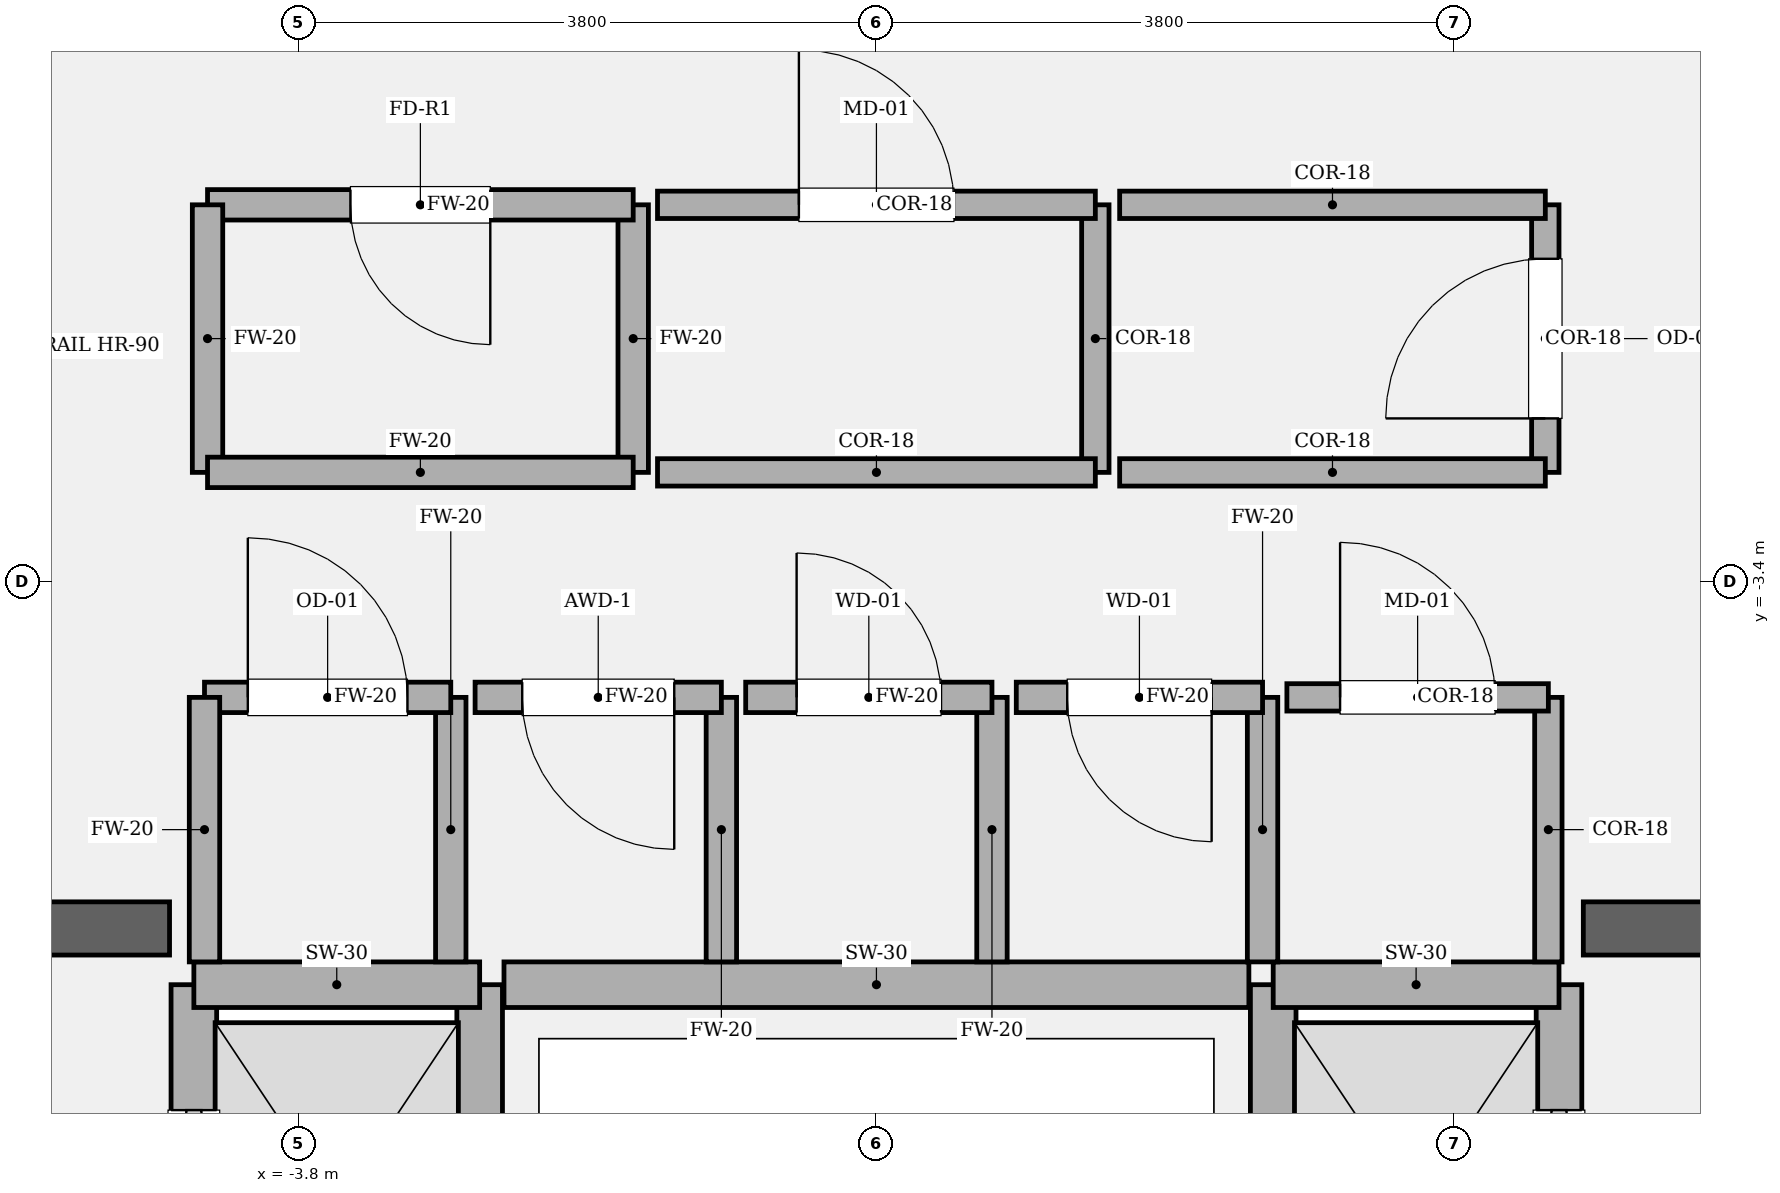
"""IFC4 building model, lengths in metres.
Left out: names, types, materials, properties, quantities, classifications, styles, units other than length and angle.
Written with IfcOpenShell. Run it as: python <this file> out.ifc"""

import sys

from ifc_helpers import new_model, si_unit, direction, frame, frame_2d, origin, place, context, subcontext, project, spatial, rectangle, extrude, element, fill, save


model = new_model("IFC4")
c1 = context("Model", 3, precision=1e-05, world=origin(), true_north=direction((0.0, 1.0)))
c2 = subcontext(c1, "Body", "Model", "MODEL_VIEW")
j1 = project(units=[si_unit("LENGTHUNIT", "METRE"), si_unit("PLANEANGLEUNIT", "RADIAN")], contexts=[c1])
p1 = place(None, origin())
s1 = spatial("IfcSite", under=j1, at=p1, CompositionType="ELEMENT")
p2 = place(p1, origin())
s2 = spatial("IfcBuilding", under=s1, at=p2, CompositionType="ELEMENT")
p3 = place(p2, frame((0.0, 0.0, 288.0)))
s3 = spatial("IfcBuildingStorey", under=s2, at=p3, CompositionType="ELEMENT", Elevation=288.0)
p4 = place(p3, frame((-9.925, -5.68, 0.0), z_axis=(0.0, 0.0, 1.0), x_axis=(1.0, 0.0, 0.0)))
e1 = element("IfcWall", 1, at=p4, inside=s3, PredefinedType="SOLIDWALL", context=c2, shape_type="SweptSolid", body=[
    extrude(rectangle(XDim=5.275, YDim=0.35, at=frame_2d((2.638, 0.0))), origin(), (0.0, 0.0, 1.0), 4.2),
])
p5 = place(p4, frame((1.385, 0.0, 0.0)))
e2 = element("IfcOpeningElement", 2, at=p5, cuts=e1, PredefinedType="OPENING", context=c2, shape_type="SweptSolid", body=[
    extrude(rectangle(XDim=1.18, YDim=2.2, at=frame_2d((0.59, 1.1))), frame((0.0, 0.185, 0.0), z_axis=(0.0, -1.0, 0.0), x_axis=(1.0, 0.0, 0.0)), (0.0, 0.0, 1.0), 0.37),
])
p6 = place(p3, frame((4.65, -5.68, 0.0), z_axis=(0.0, 0.0, 1.0), x_axis=(1.0, 0.0, 0.0)))
e3 = element("IfcWall", 3, at=p6, inside=s3, PredefinedType="SOLIDWALL", context=c2, shape_type="SweptSolid", body=[
    extrude(rectangle(XDim=5.275, YDim=0.35, at=frame_2d((2.638, 0.0))), origin(), (0.0, 0.0, 1.0), 4.2),
])
p7 = place(p6, frame((2.71, 0.0, 0.0)))
e4 = element("IfcOpeningElement", 4, at=p7, cuts=e3, PredefinedType="OPENING", context=c2, shape_type="SweptSolid", body=[
    extrude(rectangle(XDim=1.18, YDim=2.2, at=frame_2d((0.59, 1.1))), frame((0.0, 0.185, 0.0), z_axis=(0.0, -1.0, 0.0), x_axis=(1.0, 0.0, 0.0)), (0.0, 0.0, 1.0), 0.37),
])
p8 = place(p3, frame((-4.49, -8.82, 0.0), z_axis=(0.0, 0.0, 1.0), x_axis=(0.0, 1.0, 0.0)))
e5 = element("IfcWall", 5, at=p8, inside=s3, PredefinedType="SOLIDWALL", context=c2, shape_type="SweptSolid", body=[
    extrude(rectangle(XDim=2.77, YDim=0.3, at=frame_2d((1.385, 0.0))), origin(), (0.0, 0.0, 1.0), 4.0),
])
p9 = place(p8, frame((0.825, 0.0, 0.0)))
e6 = element("IfcOpeningElement", 6, at=p9, cuts=e5, PredefinedType="OPENING", context=c2, shape_type="SweptSolid", body=[
    extrude(rectangle(XDim=1.12, YDim=2.25, at=frame_2d((0.56, 1.125))), frame((0.0, 0.16, 0.0), z_axis=(0.0, -1.0, 0.0), x_axis=(1.0, 0.0, 0.0)), (0.0, 0.0, 1.0), 0.32),
])
p10 = place(p3, frame((-2.61, -8.82, 0.0), z_axis=(0.0, 0.0, 1.0), x_axis=(0.0, 1.0, 0.0)))
e7 = element("IfcWall", 7, at=p10, inside=s3, PredefinedType="SOLIDWALL", context=c2, shape_type="SweptSolid", body=[
    extrude(rectangle(XDim=2.77, YDim=0.3, at=frame_2d((1.385, 0.0))), origin(), (0.0, 0.0, 1.0), 4.0),
])
p11 = place(p3, frame((-4.49, -6.05, 0.0), z_axis=(0.0, 0.0, 1.0), x_axis=(1.0, 0.0, 0.0)))
e8 = element("IfcWall", 8, at=p11, inside=s3, PredefinedType="SOLIDWALL", context=c2, shape_type="SweptSolid", body=[
    extrude(rectangle(XDim=1.88, YDim=0.3, at=frame_2d((0.94, 0.0))), origin(), (0.0, 0.0, 1.0), 4.0),
])
p12 = place(p3, frame((4.49, -8.82, 0.0), z_axis=(0.0, 0.0, 1.0), x_axis=(0.0, 1.0, 0.0)))
e9 = element("IfcWall", 9, at=p12, inside=s3, PredefinedType="SOLIDWALL", context=c2, shape_type="SweptSolid", body=[
    extrude(rectangle(XDim=2.77, YDim=0.3, at=frame_2d((1.385, 0.0))), origin(), (0.0, 0.0, 1.0), 4.0),
])
p13 = place(p12, frame((0.825, 0.0, 0.0)))
e10 = element("IfcOpeningElement", 10, at=p13, cuts=e9, PredefinedType="OPENING", context=c2, shape_type="SweptSolid", body=[
    extrude(rectangle(XDim=1.12, YDim=2.25, at=frame_2d((0.56, 1.125))), frame((0.0, 0.16, 0.0), z_axis=(0.0, -1.0, 0.0), x_axis=(1.0, 0.0, 0.0)), (0.0, 0.0, 1.0), 0.32),
])
p14 = place(p3, frame((2.61, -8.82, 0.0), z_axis=(0.0, 0.0, 1.0), x_axis=(0.0, 1.0, 0.0)))
e11 = element("IfcWall", 11, at=p14, inside=s3, PredefinedType="SOLIDWALL", context=c2, shape_type="SweptSolid", body=[
    extrude(rectangle(XDim=2.77, YDim=0.3, at=frame_2d((1.385, 0.0))), origin(), (0.0, 0.0, 1.0), 4.0),
])
p15 = place(p3, frame((2.61, -6.05, 0.0), z_axis=(0.0, 0.0, 1.0), x_axis=(1.0, 0.0, 0.0)))
e12 = element("IfcWall", 12, at=p15, inside=s3, PredefinedType="SOLIDWALL", context=c2, shape_type="SweptSolid", body=[
    extrude(rectangle(XDim=1.88, YDim=0.3, at=frame_2d((0.94, 0.0))), origin(), (0.0, 0.0, 1.0), 4.0),
])
p16 = place(p3, frame((-2.45, -6.05, 0.0), z_axis=(0.0, 0.0, 1.0), x_axis=(1.0, 0.0, 0.0)))
e13 = element("IfcWall", 13, at=p16, inside=s3, PredefinedType="SOLIDWALL", context=c2, shape_type="SweptSolid", body=[
    extrude(rectangle(XDim=4.9, YDim=0.3, at=frame_2d((2.45, 0.0))), origin(), (0.0, 0.0, 1.0), 4.0),
])
p17 = place(p3, frame((-2.8, -5.9, 0.0), z_axis=(0.0, 0.0, 1.0), x_axis=(0.0, 1.0, 0.0)))
e14 = element("IfcWall", 14, at=p17, inside=s3, PredefinedType="SOLIDWALL", context=c2, shape_type="SweptSolid", body=[
    extrude(rectangle(XDim=1.74, YDim=0.2, at=frame_2d((0.87, 0.0))), origin(), (0.0, 0.0, 1.0), 4.0),
])
p18 = place(p3, frame((-2.8, -4.16, 0.0), z_axis=(0.0, 0.0, 1.0), x_axis=(-1.0, 0.0, 0.0)))
e15 = element("IfcWall", 15, at=p18, inside=s3, PredefinedType="SOLIDWALL", context=c2, shape_type="SweptSolid", body=[
    extrude(rectangle(XDim=1.62, YDim=0.2, at=frame_2d((0.81, 0.0))), origin(), (0.0, 0.0, 1.0), 4.0),
])
p19 = place(p18, frame((0.285, 0.0, 0.0)))
e16 = element("IfcOpeningElement", 16, at=p19, cuts=e15, PredefinedType="OPENING", context=c2, shape_type="SweptSolid", body=[
    extrude(rectangle(XDim=1.05, YDim=2.2, at=frame_2d((0.525, 1.1))), frame((0.0, 0.11, 0.0), z_axis=(0.0, -1.0, 0.0), x_axis=(1.0, 0.0, 0.0)), (0.0, 0.0, 1.0), 0.22),
])
for number, where, z_axis, x_axis in (
    (17, (-4.42, -4.16, 0.0), (0.0, 0.0, 1.0), (0.0, -1.0, 0.0)),
    (18, (-1.02, -5.9, 0.0), (0.0, 0.0, 1.0), (0.0, 1.0, 0.0)),
):
    element("IfcWall", number, at=place(p3, frame(where, z_axis=z_axis, x_axis=x_axis)), inside=s3, PredefinedType="SOLIDWALL", context=c2, shape_type="SweptSolid", body=[
        extrude(rectangle(XDim=1.74, YDim=0.2, at=frame_2d((0.87, 0.0))), origin(), (0.0, 0.0, 1.0), 4.0),
    ])
p20 = place(p3, frame((-1.02, -4.16, 0.0), z_axis=(0.0, 0.0, 1.0), x_axis=(-1.0, 0.0, 0.0)))
e19 = element("IfcWall", 19, at=p20, inside=s3, PredefinedType="SOLIDWALL", context=c2, shape_type="SweptSolid", body=[
    extrude(rectangle(XDim=1.62, YDim=0.2, at=frame_2d((0.81, 0.0))), origin(), (0.0, 0.0, 1.0), 4.0),
])
p21 = place(p20, frame((0.31, 0.0, 0.0)))
e20 = element("IfcOpeningElement", 20, at=p21, cuts=e19, PredefinedType="OPENING", context=c2, shape_type="SweptSolid", body=[
    extrude(rectangle(XDim=1.0, YDim=2.15, at=frame_2d((0.5, 1.075))), frame((0.0, 0.11, 0.0), z_axis=(0.0, -1.0, 0.0), x_axis=(1.0, 0.0, 0.0)), (0.0, 0.0, 1.0), 0.22),
])
p22 = place(p3, frame((0.76, -5.9, 0.0), z_axis=(0.0, 0.0, 1.0), x_axis=(0.0, 1.0, 0.0)))
e21 = element("IfcWall", 21, at=p22, inside=s3, PredefinedType="SOLIDWALL", context=c2, shape_type="SweptSolid", body=[
    extrude(rectangle(XDim=1.74, YDim=0.2, at=frame_2d((0.87, 0.0))), origin(), (0.0, 0.0, 1.0), 4.0),
])
p23 = place(p3, frame((0.76, -4.16, 0.0), z_axis=(0.0, 0.0, 1.0), x_axis=(-1.0, 0.0, 0.0)))
e22 = element("IfcWall", 22, at=p23, inside=s3, PredefinedType="SOLIDWALL", context=c2, shape_type="SweptSolid", body=[
    extrude(rectangle(XDim=1.62, YDim=0.2, at=frame_2d((0.81, 0.0))), origin(), (0.0, 0.0, 1.0), 4.0),
])
p24 = place(p23, frame((0.335, 0.0, 0.0)))
e23 = element("IfcOpeningElement", 23, at=p24, cuts=e22, PredefinedType="OPENING", context=c2, shape_type="SweptSolid", body=[
    extrude(rectangle(XDim=0.95, YDim=2.15, at=frame_2d((0.475, 1.075))), frame((0.0, 0.11, 0.0), z_axis=(0.0, -1.0, 0.0), x_axis=(1.0, 0.0, 0.0)), (0.0, 0.0, 1.0), 0.22),
])
p25 = place(p3, frame((2.54, -5.9, 0.0), z_axis=(0.0, 0.0, 1.0), x_axis=(0.0, 1.0, 0.0)))
e24 = element("IfcWall", 24, at=p25, inside=s3, PredefinedType="SOLIDWALL", context=c2, shape_type="SweptSolid", body=[
    extrude(rectangle(XDim=1.74, YDim=0.2, at=frame_2d((0.87, 0.0))), origin(), (0.0, 0.0, 1.0), 4.0),
])
p26 = place(p3, frame((2.54, -4.16, 0.0), z_axis=(0.0, 0.0, 1.0), x_axis=(-1.0, 0.0, 0.0)))
e25 = element("IfcWall", 25, at=p26, inside=s3, PredefinedType="SOLIDWALL", context=c2, shape_type="SweptSolid", body=[
    extrude(rectangle(XDim=1.62, YDim=0.2, at=frame_2d((0.81, 0.0))), origin(), (0.0, 0.0, 1.0), 4.0),
])
p27 = place(p26, frame((0.335, 0.0, 0.0)))
e26 = element("IfcOpeningElement", 26, at=p27, cuts=e25, PredefinedType="OPENING", context=c2, shape_type="SweptSolid", body=[
    extrude(rectangle(XDim=0.95, YDim=2.15, at=frame_2d((0.475, 1.075))), frame((0.0, 0.11, 0.0), z_axis=(0.0, -1.0, 0.0), x_axis=(1.0, 0.0, 0.0)), (0.0, 0.0, 1.0), 0.22),
])
p28 = place(p3, frame((4.42, -5.9, 0.0), z_axis=(0.0, 0.0, 1.0), x_axis=(0.0, 1.0, 0.0)))
e27 = element("IfcWall", 27, at=p28, inside=s3, PredefinedType="PARTITIONING", context=c2, shape_type="SweptSolid", body=[
    extrude(rectangle(XDim=1.74, YDim=0.18, at=frame_2d((0.87, 0.0))), origin(), (0.0, 0.0, 1.0), 4.0),
])
p29 = place(p3, frame((4.42, -4.16, 0.0), z_axis=(0.0, 0.0, 1.0), x_axis=(-1.0, 0.0, 0.0)))
e28 = element("IfcWall", 28, at=p29, inside=s3, PredefinedType="PARTITIONING", context=c2, shape_type="SweptSolid", body=[
    extrude(rectangle(XDim=1.72, YDim=0.18, at=frame_2d((0.86, 0.0))), origin(), (0.0, 0.0, 1.0), 4.0),
])
p30 = place(p29, frame((0.35, 0.0, 0.0)))
e29 = element("IfcOpeningElement", 29, at=p30, cuts=e28, PredefinedType="OPENING", context=c2, shape_type="SweptSolid", body=[
    extrude(rectangle(XDim=1.02, YDim=2.2, at=frame_2d((0.51, 1.1))), frame((0.0, 0.1, 0.0), z_axis=(0.0, -1.0, 0.0), x_axis=(1.0, 0.0, 0.0)), (0.0, 0.0, 1.0), 0.2),
])
p31 = place(p3, frame((-1.6, -2.68, 0.0), z_axis=(0.0, 0.0, 1.0), x_axis=(0.0, 1.0, 0.0)))
e30 = element("IfcWall", 30, at=p31, inside=s3, PredefinedType="SOLIDWALL", context=c2, shape_type="SweptSolid", body=[
    extrude(rectangle(XDim=1.76, YDim=0.2, at=frame_2d((0.88, 0.0))), origin(), (0.0, 0.0, 1.0), 4.0),
])
p32 = place(p3, frame((-1.6, -0.92, 0.0), z_axis=(0.0, 0.0, 1.0), x_axis=(-1.0, 0.0, 0.0)))
e31 = element("IfcWall", 31, at=p32, inside=s3, PredefinedType="SOLIDWALL", context=c2, shape_type="SweptSolid", body=[
    extrude(rectangle(XDim=2.8, YDim=0.2, at=frame_2d((1.4, 0.0))), origin(), (0.0, 0.0, 1.0), 4.0),
])
p33 = place(p32, frame((0.94, 0.0, 0.0)))
e32 = element("IfcOpeningElement", 32, at=p33, cuts=e31, PredefinedType="OPENING", context=c2, shape_type="SweptSolid", body=[
    extrude(rectangle(XDim=0.92, YDim=2.1, at=frame_2d((0.46, 1.05))), frame((0.0, 0.11, 0.0), z_axis=(0.0, -1.0, 0.0), x_axis=(1.0, 0.0, 0.0)), (0.0, 0.0, 1.0), 0.22),
])
p34 = place(p3, frame((-4.4, -0.92, 0.0), z_axis=(0.0, 0.0, 1.0), x_axis=(0.0, -1.0, 0.0)))
e33 = element("IfcWall", 33, at=p34, inside=s3, PredefinedType="SOLIDWALL", context=c2, shape_type="SweptSolid", body=[
    extrude(rectangle(XDim=1.76, YDim=0.2, at=frame_2d((0.88, 0.0))), origin(), (0.0, 0.0, 1.0), 4.0),
])
p35 = place(p3, frame((-4.4, -2.68, 0.0), z_axis=(0.0, 0.0, 1.0), x_axis=(1.0, 0.0, 0.0)))
e34 = element("IfcWall", 34, at=p35, inside=s3, PredefinedType="SOLIDWALL", context=c2, shape_type="SweptSolid", body=[
    extrude(rectangle(XDim=2.8, YDim=0.2, at=frame_2d((1.4, 0.0))), origin(), (0.0, 0.0, 1.0), 4.0),
])
p36 = place(p3, frame((1.44, -2.68, 0.0), z_axis=(0.0, 0.0, 1.0), x_axis=(0.0, 1.0, 0.0)))
e35 = element("IfcWall", 35, at=p36, inside=s3, PredefinedType="PARTITIONING", context=c2, shape_type="SweptSolid", body=[
    extrude(rectangle(XDim=1.76, YDim=0.18, at=frame_2d((0.88, 0.0))), origin(), (0.0, 0.0, 1.0), 4.0),
])
p37 = place(p3, frame((1.44, -0.92, 0.0), z_axis=(0.0, 0.0, 1.0), x_axis=(-1.0, 0.0, 0.0)))
e36 = element("IfcWall", 36, at=p37, inside=s3, PredefinedType="PARTITIONING", context=c2, shape_type="SweptSolid", body=[
    extrude(rectangle(XDim=2.88, YDim=0.18, at=frame_2d((1.44, 0.0))), origin(), (0.0, 0.0, 1.0), 4.0),
])
p38 = place(p37, frame((0.93, 0.0, 0.0)))
e37 = element("IfcOpeningElement", 37, at=p38, cuts=e36, PredefinedType="OPENING", context=c2, shape_type="SweptSolid", body=[
    extrude(rectangle(XDim=1.02, YDim=2.2, at=frame_2d((0.51, 1.1))), frame((0.0, 0.1, 0.0), z_axis=(0.0, -1.0, 0.0), x_axis=(1.0, 0.0, 0.0)), (0.0, 0.0, 1.0), 0.2),
])
p39 = place(p3, frame((-1.44, -2.68, 0.0), z_axis=(0.0, 0.0, 1.0), x_axis=(1.0, 0.0, 0.0)))
e38 = element("IfcWall", 38, at=p39, inside=s3, PredefinedType="PARTITIONING", context=c2, shape_type="SweptSolid", body=[
    extrude(rectangle(XDim=2.88, YDim=0.18, at=frame_2d((1.44, 0.0))), origin(), (0.0, 0.0, 1.0), 4.0),
])
p40 = place(p3, frame((4.4, -2.68, 0.0), z_axis=(0.0, 0.0, 1.0), x_axis=(0.0, 1.0, 0.0)))
e39 = element("IfcWall", 39, at=p40, inside=s3, PredefinedType="PARTITIONING", context=c2, shape_type="SweptSolid", body=[
    extrude(rectangle(XDim=1.76, YDim=0.18, at=frame_2d((0.88, 0.0))), origin(), (0.0, 0.0, 1.0), 4.0),
])
p41 = place(p40, frame((0.355, 0.0, 0.0)))
e40 = element("IfcOpeningElement", 40, at=p41, cuts=e39, PredefinedType="OPENING", context=c2, shape_type="SweptSolid", body=[
    extrude(rectangle(XDim=1.05, YDim=2.2, at=frame_2d((0.525, 1.1))), frame((0.0, 0.1, 0.0), z_axis=(0.0, -1.0, 0.0), x_axis=(1.0, 0.0, 0.0)), (0.0, 0.0, 1.0), 0.2),
])
for number, where, z_axis, x_axis in (
    (41, (4.4, -0.92, 0.0), (0.0, 0.0, 1.0), (-1.0, 0.0, 0.0)),
    (42, (1.6, -2.68, 0.0), (0.0, 0.0, 1.0), (1.0, 0.0, 0.0)),
):
    element("IfcWall", number, at=place(p3, frame(where, z_axis=z_axis, x_axis=x_axis)), inside=s3, PredefinedType="PARTITIONING", context=c2, shape_type="SweptSolid", body=[
        extrude(rectangle(XDim=2.8, YDim=0.18, at=frame_2d((1.4, 0.0))), origin(), (0.0, 0.0, 1.0), 4.0),
    ])
p42 = place(p9, origin())
e43 = element("IfcDoor", 43, at=p42, inside=s3, OperationType="SLIDING_TO_LEFT", PredefinedType="DOOR", context=c2, shape_type="SweptSolid", body=[
    extrude(rectangle(XDim=1.12, YDim=2.25, at=frame_2d((0.56, 1.125))), frame((0.0, 0.025, 0.0), z_axis=(0.0, -1.0, 0.0), x_axis=(1.0, 0.0, 0.0)), (0.0, 0.0, 1.0), 0.05),
])
fill(e6, e43)
p43 = place(p13, origin())
e44 = element("IfcDoor", 44, at=p43, inside=s3, OperationType="SLIDING_TO_RIGHT", PredefinedType="DOOR", context=c2, shape_type="SweptSolid", body=[
    extrude(rectangle(XDim=1.12, YDim=2.25, at=frame_2d((0.56, 1.125))), frame((0.0, 0.025, 0.0), z_axis=(0.0, -1.0, 0.0), x_axis=(1.0, 0.0, 0.0)), (0.0, 0.0, 1.0), 0.05),
])
fill(e10, e44)
p44 = place(p19, origin())
e45 = element("IfcDoor", 45, at=p44, inside=s3, OperationType="SINGLE_SWING_RIGHT", PredefinedType="DOOR", context=c2, shape_type="SweptSolid", body=[
    extrude(rectangle(XDim=1.05, YDim=2.2, at=frame_2d((0.525, 1.1))), frame((0.0, 0.025, 0.0), z_axis=(0.0, -1.0, 0.0), x_axis=(1.0, 0.0, 0.0)), (0.0, 0.0, 1.0), 0.05),
])
fill(e16, e45)
p45 = place(p21, origin())
e46 = element("IfcDoor", 46, at=p45, inside=s3, OperationType="SINGLE_SWING_LEFT", PredefinedType="DOOR", context=c2, shape_type="SweptSolid", body=[
    extrude(rectangle(XDim=1.0, YDim=2.15, at=frame_2d((0.5, 1.075))), frame((0.0, 0.025, 0.0), z_axis=(0.0, -1.0, 0.0), x_axis=(1.0, 0.0, 0.0)), (0.0, 0.0, 1.0), 0.05),
])
fill(e20, e46)
p46 = place(p24, origin())
e47 = element("IfcDoor", 47, at=p46, inside=s3, OperationType="SINGLE_SWING_RIGHT", PredefinedType="DOOR", context=c2, shape_type="SweptSolid", body=[
    extrude(rectangle(XDim=0.95, YDim=2.15, at=frame_2d((0.475, 1.075))), frame((0.0, 0.025, 0.0), z_axis=(0.0, -1.0, 0.0), x_axis=(1.0, 0.0, 0.0)), (0.0, 0.0, 1.0), 0.05),
])
fill(e23, e47)
p47 = place(p27, origin())
e48 = element("IfcDoor", 48, at=p47, inside=s3, OperationType="SINGLE_SWING_LEFT", PredefinedType="DOOR", context=c2, shape_type="SweptSolid", body=[
    extrude(rectangle(XDim=0.95, YDim=2.15, at=frame_2d((0.475, 1.075))), frame((0.0, 0.025, 0.0), z_axis=(0.0, -1.0, 0.0), x_axis=(1.0, 0.0, 0.0)), (0.0, 0.0, 1.0), 0.05),
])
fill(e26, e48)
p48 = place(p30, origin())
e49 = element("IfcDoor", 49, at=p48, inside=s3, OperationType="SINGLE_SWING_RIGHT", PredefinedType="DOOR", context=c2, shape_type="SweptSolid", body=[
    extrude(rectangle(XDim=1.02, YDim=2.2, at=frame_2d((0.51, 1.1))), frame((0.0, 0.025, 0.0), z_axis=(0.0, -1.0, 0.0), x_axis=(1.0, 0.0, 0.0)), (0.0, 0.0, 1.0), 0.05),
])
fill(e29, e49)
p49 = place(p33, origin())
e50 = element("IfcDoor", 50, at=p49, inside=s3, OperationType="SINGLE_SWING_LEFT", PredefinedType="DOOR", context=c2, shape_type="SweptSolid", body=[
    extrude(rectangle(XDim=0.92, YDim=2.1, at=frame_2d((0.46, 1.05))), frame((0.0, 0.025, 0.0), z_axis=(0.0, -1.0, 0.0), x_axis=(1.0, 0.0, 0.0)), (0.0, 0.0, 1.0), 0.05),
])
fill(e32, e50)
p50 = place(p38, origin())
e51 = element("IfcDoor", 51, at=p50, inside=s3, OperationType="SINGLE_SWING_RIGHT", PredefinedType="DOOR", context=c2, shape_type="SweptSolid", body=[
    extrude(rectangle(XDim=1.02, YDim=2.2, at=frame_2d((0.51, 1.1))), frame((0.0, 0.025, 0.0), z_axis=(0.0, -1.0, 0.0), x_axis=(1.0, 0.0, 0.0)), (0.0, 0.0, 1.0), 0.05),
])
fill(e37, e51)
p51 = place(p41, origin())
e52 = element("IfcDoor", 52, at=p51, inside=s3, OperationType="SINGLE_SWING_LEFT", PredefinedType="DOOR", context=c2, shape_type="SweptSolid", body=[
    extrude(rectangle(XDim=1.05, YDim=2.2, at=frame_2d((0.525, 1.1))), frame((0.0, 0.025, 0.0), z_axis=(0.0, -1.0, 0.0), x_axis=(1.0, 0.0, 0.0)), (0.0, 0.0, 1.0), 0.05),
])
fill(e40, e52)
save(model, sys.argv[1])
